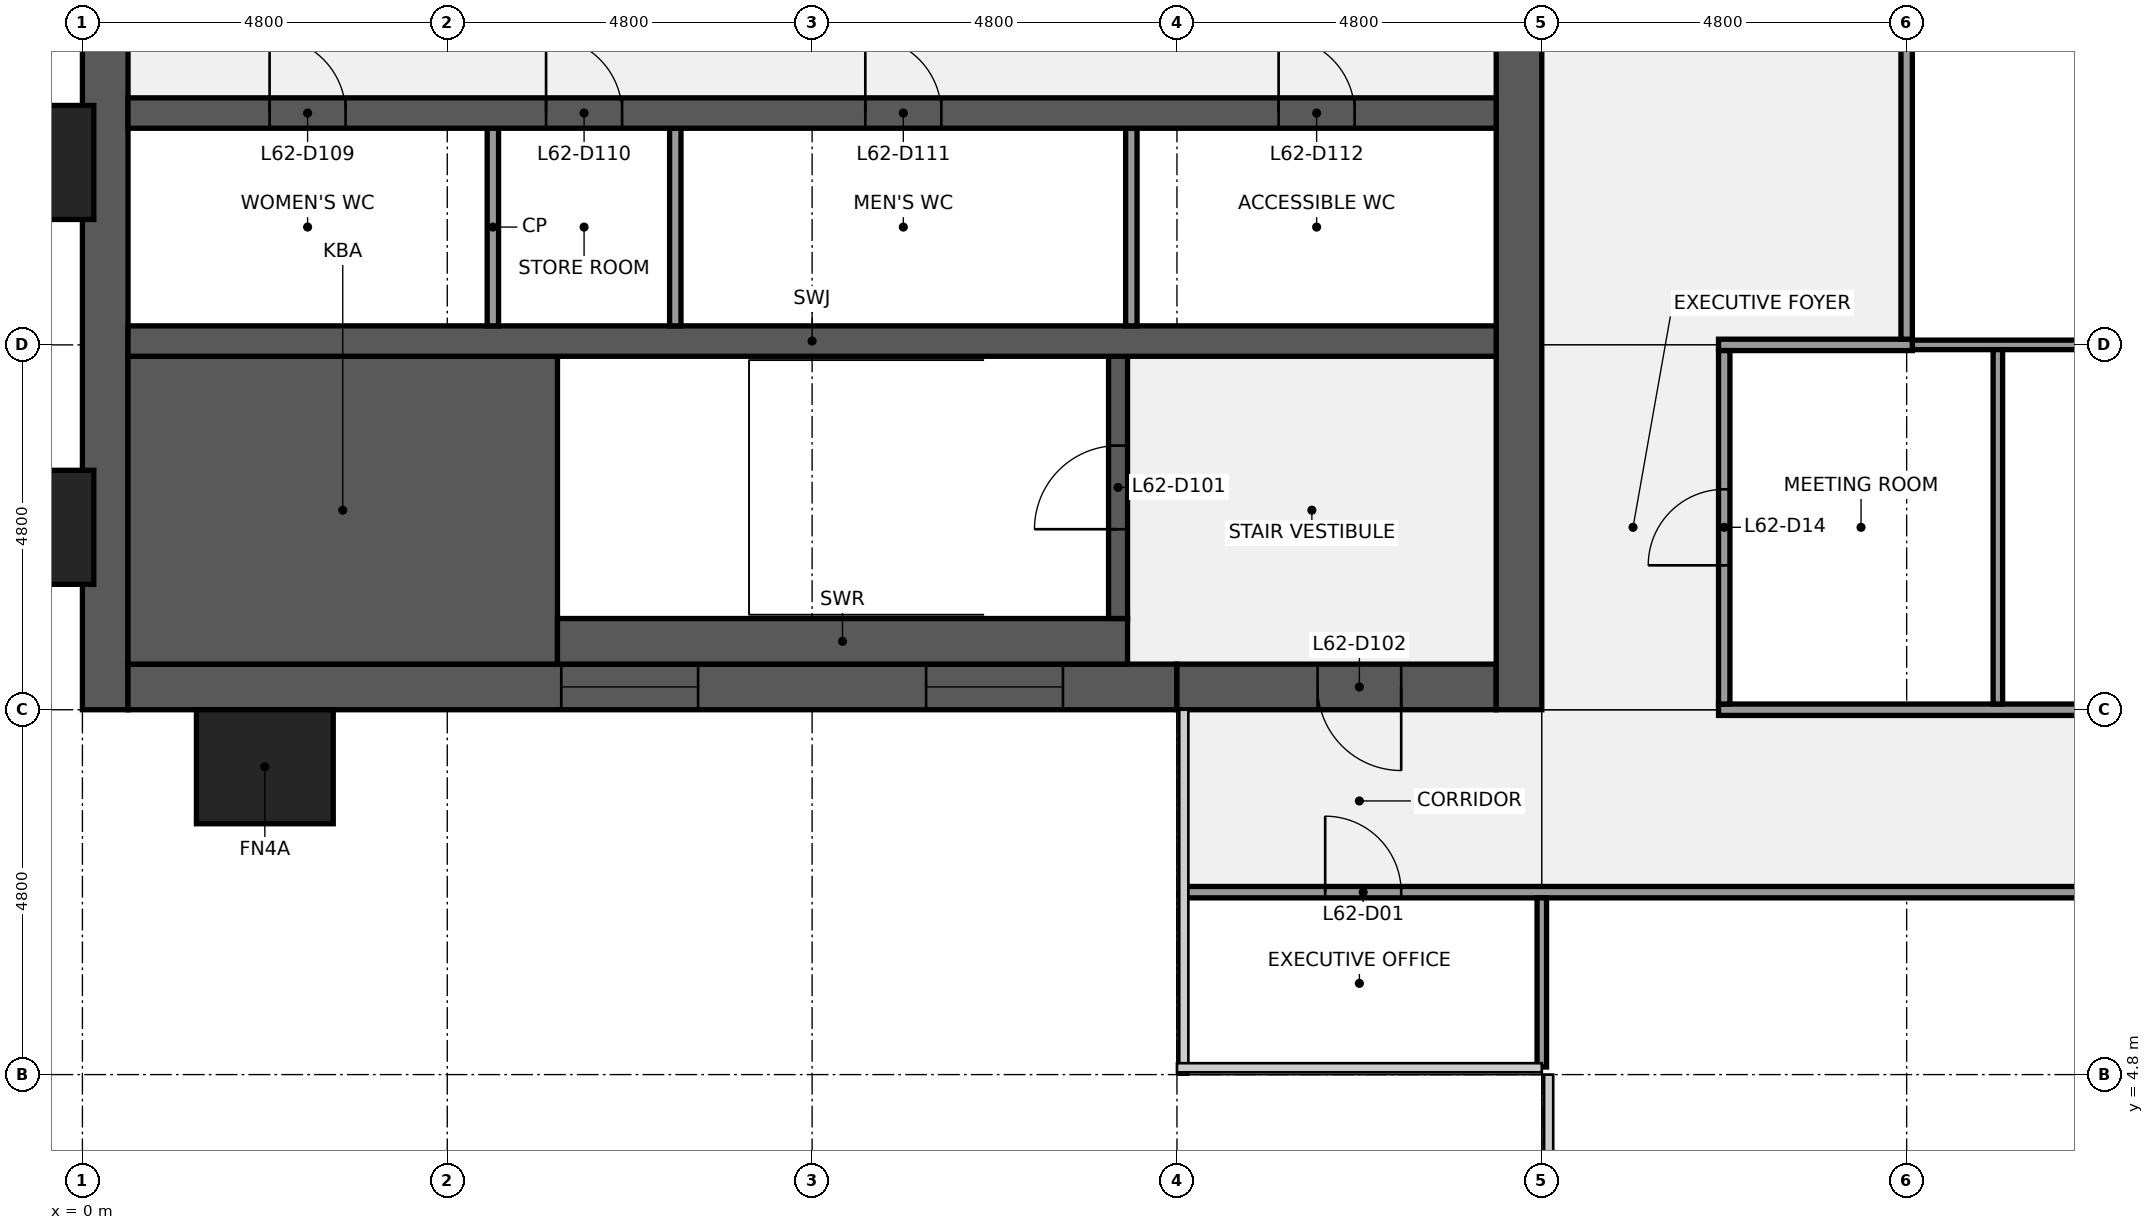
"""IFC4 building model, lengths in metres.
Left out: names, types, materials, properties, quantities, classifications, styles, units other than length and angle.
Written with IfcOpenShell. Run it as: python <this file> out.ifc"""

import sys

from ifc_helpers import new_model, si_unit, direction, frame, frame_2d, origin, origin_2d, place, context, subcontext, project, spatial, rectangle, extrude, element, fill, save


model = new_model("IFC4")
c1 = context("Model", 3, precision=1e-05, world=origin(), true_north=direction((0.0, 1.0)))
c2 = subcontext(c1, "Body", "Model", "MODEL_VIEW")
j1 = project(units=[si_unit("LENGTHUNIT", "METRE"), si_unit("PLANEANGLEUNIT", "RADIAN")], contexts=[c1])
p1 = place(None, origin())
s1 = spatial("IfcSite", under=j1, at=p1, CompositionType="ELEMENT")
p2 = place(p1, origin())
s2 = spatial("IfcBuilding", under=s1, at=p2, CompositionType="ELEMENT")
p3 = place(p2, frame((0.0, 0.0, 286.3)))
s3 = spatial("IfcBuildingStorey", under=s2, at=p3, CompositionType="ELEMENT", Elevation=286.3)
p4 = place(p3, frame((0.3, 9.6, 0.0), z_axis=(0.0, 0.0, 1.0), x_axis=(0.0, 1.0, 0.0)))
e1 = element("IfcWall", 1, at=p4, inside=s3, PredefinedType="SHEAR", context=c2, shape_type="SweptSolid", body=[
    extrude(rectangle(XDim=28.8, YDim=0.6, at=frame_2d((14.4, 0.0))), origin(), (0.0, 0.0, 1.0), 3.84),
])
p5 = place(p4, frame((8.85, 0.0, 0.9)))
e2 = element("IfcOpeningElement", 2, at=p5, cuts=e1, PredefinedType="OPENING", context=c2, shape_type="SweptSolid", body=[
    extrude(rectangle(XDim=1.5, YDim=1.5, at=frame_2d((0.75, 0.75))), frame((0.0, 0.31, 0.0), z_axis=(0.0, -1.0, 0.0), x_axis=(1.0, 0.0, 0.0)), (0.0, 0.0, 1.0), 0.62),
])
p6 = place(p4, frame((18.45, 0.0, 0.9)))
e3 = element("IfcOpeningElement", 3, at=p6, cuts=e1, PredefinedType="OPENING", context=c2, shape_type="SweptSolid", body=[
    extrude(rectangle(XDim=1.5, YDim=1.5, at=frame_2d((0.75, 0.75))), frame((0.0, 0.31, 0.0), z_axis=(0.0, -1.0, 0.0), x_axis=(1.0, 0.0, 0.0)), (0.0, 0.0, 1.0), 0.62),
])
p7 = place(p3, frame((14.4, 9.9, 0.0), z_axis=(0.0, 0.0, 1.0), x_axis=(-1.0, 0.0, 0.0)))
e4 = element("IfcWall", 4, at=p7, inside=s3, PredefinedType="SHEAR", context=c2, shape_type="SweptSolid", body=[
    extrude(rectangle(XDim=13.8, YDim=0.6, at=frame_2d((6.9, 0.0))), origin(), (0.0, 0.0, 1.0), 3.84),
])
p8 = place(p7, frame((6.3, 0.0, 0.9)))
e5 = element("IfcOpeningElement", 5, at=p8, cuts=e4, PredefinedType="OPENING", context=c2, shape_type="SweptSolid", body=[
    extrude(rectangle(XDim=1.8, YDim=1.5, at=frame_2d((0.9, 0.75))), frame((0.0, 0.31, 0.0), z_axis=(0.0, -1.0, 0.0), x_axis=(1.0, 0.0, 0.0)), (0.0, 0.0, 1.0), 0.62),
])
p9 = place(p7, frame((1.5, 0.0, 0.9)))
e6 = element("IfcOpeningElement", 6, at=p9, cuts=e4, PredefinedType="OPENING", context=c2, shape_type="SweptSolid", body=[
    extrude(rectangle(XDim=1.8, YDim=1.5, at=frame_2d((0.9, 0.75))), frame((0.0, 0.31, 0.0), z_axis=(0.0, -1.0, 0.0), x_axis=(1.0, 0.0, 0.0)), (0.0, 0.0, 1.0), 0.62),
])
p10 = place(p3, frame((18.6, 9.9, 0.0), z_axis=(0.0, 0.0, 1.0), x_axis=(-1.0, 0.0, 0.0)))
e7 = element("IfcWall", 7, at=p10, inside=s3, PredefinedType="SHEAR", context=c2, shape_type="SweptSolid", body=[
    extrude(rectangle(XDim=4.2, YDim=0.6, at=frame_2d((2.1, 0.0))), origin(), (0.0, 0.0, 1.0), 3.84),
])
p11 = place(p10, frame((1.25, 0.0, 0.0)))
e8 = element("IfcOpeningElement", 8, at=p11, cuts=e7, PredefinedType="OPENING", context=c2, shape_type="SweptSolid", body=[
    extrude(rectangle(XDim=1.1, YDim=2.1, at=frame_2d((0.55, 1.05))), frame((0.0, 0.31, 0.0), z_axis=(0.0, -1.0, 0.0), x_axis=(1.0, 0.0, 0.0)), (0.0, 0.0, 1.0), 0.62),
])
p12 = place(p3, frame((18.9, 38.4, 0.0), z_axis=(0.0, 0.0, 1.0), x_axis=(0.0, -1.0, 0.0)))
e9 = element("IfcWall", 9, at=p12, inside=s3, PredefinedType="SHEAR", context=c2, shape_type="SweptSolid", body=[
    extrude(rectangle(XDim=28.8, YDim=0.6, at=frame_2d((14.4, 0.0))), origin(), (0.0, 0.0, 1.0), 3.84),
])
p13 = place(p12, frame((18.3, 0.0, 0.0)))
e10 = element("IfcOpeningElement", 10, at=p13, cuts=e9, PredefinedType="OPENING", context=c2, shape_type="SweptSolid", body=[
    extrude(rectangle(XDim=1.8, YDim=2.1, at=frame_2d((0.9, 1.05))), frame((0.0, 0.31, 0.0), z_axis=(0.0, -1.0, 0.0), x_axis=(1.0, 0.0, 0.0)), (0.0, 0.0, 1.0), 0.62),
])
p14 = place(p12, frame((8.7, 0.0, 0.0)))
e11 = element("IfcOpeningElement", 11, at=p14, cuts=e9, PredefinedType="OPENING", context=c2, shape_type="SweptSolid", body=[
    extrude(rectangle(XDim=1.8, YDim=2.1, at=frame_2d((0.9, 1.05))), frame((0.0, 0.31, 0.0), z_axis=(0.0, -1.0, 0.0), x_axis=(1.0, 0.0, 0.0)), (0.0, 0.0, 1.0), 0.62),
])
p15 = place(p3, frame((0.6, 12.225, 0.0), z_axis=(0.0, 0.0, 1.0), x_axis=(1.0, 0.0, 0.0)))
e12 = element("IfcWall", 12, at=p15, inside=s3, PredefinedType="SHEAR", context=c2, shape_type="SweptSolid", body=[
    extrude(rectangle(XDim=5.65, YDim=4.05, at=frame_2d((2.825, 0.0))), origin(), (0.0, 0.0, 1.0), 3.84),
])
p16 = place(p3, frame((6.25, 10.5, 0.0), z_axis=(0.0, 0.0, 1.0), x_axis=(1.0, 0.0, 0.0)))
e13 = element("IfcWall", 13, at=p16, inside=s3, PredefinedType="SHEAR", context=c2, shape_type="SweptSolid", body=[
    extrude(rectangle(XDim=7.5, YDim=0.6, at=frame_2d((3.75, 0.0))), origin(), (0.0, 0.0, 1.0), 3.84),
])
p17 = place(p3, frame((13.625, 10.8, 0.0), z_axis=(0.0, 0.0, 1.0), x_axis=(0.0, 1.0, 0.0)))
e14 = element("IfcWall", 14, at=p17, inside=s3, PredefinedType="SHEAR", context=c2, shape_type="SweptSolid", body=[
    extrude(rectangle(XDim=3.45, YDim=0.25, at=frame_2d((1.725, 0.0))), origin(), (0.0, 0.0, 1.0), 3.84),
])
p18 = place(p17, frame((1.175, 0.0, 0.0)))
e15 = element("IfcOpeningElement", 15, at=p18, cuts=e14, PredefinedType="OPENING", context=c2, shape_type="SweptSolid", body=[
    extrude(rectangle(XDim=1.1, YDim=2.1, at=frame_2d((0.55, 1.05))), frame((0.0, 0.135, 0.0), z_axis=(0.0, -1.0, 0.0), x_axis=(1.0, 0.0, 0.0)), (0.0, 0.0, 1.0), 0.27),
])
p19 = place(p3, frame((0.6, 14.45, 0.0), z_axis=(0.0, 0.0, 1.0), x_axis=(1.0, 0.0, 0.0)))
e16 = element("IfcWall", 16, at=p19, inside=s3, PredefinedType="SHEAR", context=c2, shape_type="SweptSolid", body=[
    extrude(rectangle(XDim=18.0, YDim=0.4, at=frame_2d((9.0, 0.0))), origin(), (0.0, 0.0, 1.0), 3.84),
])
for number, where, z_axis, x_axis in (
    (17, (5.4, 14.65, 0.0), (0.0, 0.0, 1.0), (0.0, 1.0, 0.0)),
    (18, (7.8, 14.65, 0.0), (0.0, 0.0, 1.0), (0.0, 1.0, 0.0)),
    (19, (13.8, 14.65, 0.0), (0.0, 0.0, 1.0), (0.0, 1.0, 0.0)),
):
    element("IfcWall", number, at=place(p3, frame(where, z_axis=z_axis, x_axis=x_axis)), inside=s3, PredefinedType="PARTITIONING", context=c2, shape_type="SweptSolid", body=[
        extrude(rectangle(XDim=2.6, YDim=0.15, at=frame_2d((1.3, 0.0))), origin(), (0.0, 0.0, 1.0), 3.84),
    ])
p20 = place(p3, frame((0.6, 17.45, 0.0), z_axis=(0.0, 0.0, 1.0), x_axis=(1.0, 0.0, 0.0)))
e20 = element("IfcWall", 20, at=p20, inside=s3, PredefinedType="SHEAR", context=c2, shape_type="SweptSolid", body=[
    extrude(rectangle(XDim=18.0, YDim=0.4, at=frame_2d((9.0, 0.0))), origin(), (0.0, 0.0, 1.0), 3.84),
])
p21 = place(p20, frame((1.863, 0.0, 0.0)))
e21 = element("IfcOpeningElement", 21, at=p21, cuts=e20, PredefinedType="OPENING", context=c2, shape_type="SweptSolid", body=[
    extrude(rectangle(XDim=1.0, YDim=2.1, at=frame_2d((0.5, 1.05))), frame((0.0, 0.21, 0.0), z_axis=(0.0, -1.0, 0.0), x_axis=(1.0, 0.0, 0.0)), (0.0, 0.0, 1.0), 0.42),
])
p22 = place(p20, frame((5.5, 0.0, 0.0)))
e22 = element("IfcOpeningElement", 22, at=p22, cuts=e20, PredefinedType="OPENING", context=c2, shape_type="SweptSolid", body=[
    extrude(rectangle(XDim=1.0, YDim=2.1, at=frame_2d((0.5, 1.05))), frame((0.0, 0.21, 0.0), z_axis=(0.0, -1.0, 0.0), x_axis=(1.0, 0.0, 0.0)), (0.0, 0.0, 1.0), 0.42),
])
p23 = place(p20, frame((9.7, 0.0, 0.0)))
e23 = element("IfcOpeningElement", 23, at=p23, cuts=e20, PredefinedType="OPENING", context=c2, shape_type="SweptSolid", body=[
    extrude(rectangle(XDim=1.0, YDim=2.1, at=frame_2d((0.5, 1.05))), frame((0.0, 0.21, 0.0), z_axis=(0.0, -1.0, 0.0), x_axis=(1.0, 0.0, 0.0)), (0.0, 0.0, 1.0), 0.42),
])
p24 = place(p20, frame((15.137, 0.0, 0.0)))
e24 = element("IfcOpeningElement", 24, at=p24, cuts=e20, PredefinedType="OPENING", context=c2, shape_type="SweptSolid", body=[
    extrude(rectangle(XDim=1.0, YDim=2.1, at=frame_2d((0.5, 1.05))), frame((0.0, 0.21, 0.0), z_axis=(0.0, -1.0, 0.0), x_axis=(1.0, 0.0, 0.0)), (0.0, 0.0, 1.0), 0.42),
])
p25 = place(p3, frame((14.5, 7.2, 0.0), z_axis=(0.0, 0.0, 1.0), x_axis=(1.0, 0.0, 0.0)))
e25 = element("IfcWall", 25, at=p25, inside=s3, PredefinedType="PARTITIONING", context=c2, shape_type="SweptSolid", body=[
    extrude(rectangle(XDim=28.6, YDim=0.15, at=frame_2d((14.3, 0.0))), origin(), (0.0, 0.0, 1.0), 2.849),
])
p26 = place(p25, frame((1.85, 0.0, 0.0)))
e26 = element("IfcOpeningElement", 26, at=p26, cuts=e25, PredefinedType="OPENING", context=c2, shape_type="SweptSolid", body=[
    extrude(rectangle(XDim=1.0, YDim=2.1, at=frame_2d((0.5, 1.05))), frame((0.0, 0.085, 0.0), z_axis=(0.0, -1.0, 0.0), x_axis=(1.0, 0.0, 0.0)), (0.0, 0.0, 1.0), 0.17),
])
p27 = place(p25, frame((13.8, 0.0, 0.0)))
e27 = element("IfcOpeningElement", 27, at=p27, cuts=e25, PredefinedType="OPENING", context=c2, shape_type="SweptSolid", body=[
    extrude(rectangle(XDim=1.0, YDim=2.1, at=frame_2d((0.5, 1.05))), frame((0.0, 0.085, 0.0), z_axis=(0.0, -1.0, 0.0), x_axis=(1.0, 0.0, 0.0)), (0.0, 0.0, 1.0), 0.17),
])
p28 = place(p25, frame((25.75, 0.0, 0.0)))
e28 = element("IfcOpeningElement", 28, at=p28, cuts=e25, PredefinedType="OPENING", context=c2, shape_type="SweptSolid", body=[
    extrude(rectangle(XDim=1.0, YDim=2.1, at=frame_2d((0.5, 1.05))), frame((0.0, 0.085, 0.0), z_axis=(0.0, -1.0, 0.0), x_axis=(1.0, 0.0, 0.0)), (0.0, 0.0, 1.0), 0.17),
])
p29 = place(p3, frame((21.525, 9.6, 0.0), z_axis=(0.0, 0.0, 1.0), x_axis=(1.0, 0.0, 0.0)))
e29 = element("IfcWall", 29, at=p29, inside=s3, PredefinedType="PARTITIONING", context=c2, shape_type="SweptSolid", body=[
    extrude(rectangle(XDim=14.55, YDim=0.15, at=frame_2d((7.275, 0.0))), origin(), (0.0, 0.0, 1.0), 2.849),
])
p30 = place(p29, frame((6.775, 0.0, 0.0)))
e30 = element("IfcOpeningElement", 30, at=p30, cuts=e29, PredefinedType="OPENING", context=c2, shape_type="SweptSolid", body=[
    extrude(rectangle(XDim=1.0, YDim=2.1, at=frame_2d((0.5, 1.05))), frame((0.0, 0.085, 0.0), z_axis=(0.0, -1.0, 0.0), x_axis=(1.0, 0.0, 0.0)), (0.0, 0.0, 1.0), 0.17),
])
p31 = place(p3, frame((24.075, 14.4, 0.0), z_axis=(0.0, 0.0, 1.0), x_axis=(1.0, 0.0, 0.0)))
e31 = element("IfcWall", 31, at=p31, inside=s3, PredefinedType="PARTITIONING", context=c2, shape_type="SweptSolid", body=[
    extrude(rectangle(XDim=9.6, YDim=0.125, at=frame_2d((4.8, 0.0))), origin(), (0.0, 0.0, 1.0), 2.849),
])
p32 = place(p3, frame((21.525, 14.4, 0.0), z_axis=(0.0, 0.0, 1.0), x_axis=(1.0, 0.0, 0.0)))
e32 = element("IfcWall", 32, at=p32, inside=s3, PredefinedType="PARTITIONING", context=c2, shape_type="SweptSolid", body=[
    extrude(rectangle(XDim=2.55, YDim=0.15, at=frame_2d((1.275, 0.0))), origin(), (0.0, 0.0, 1.0), 2.849),
])
p33 = place(p3, frame((19.2, 4.9, 0.0), z_axis=(0.0, 0.0, 1.0), x_axis=(0.0, 1.0, 0.0)))
e33 = element("IfcWall", 33, at=p33, inside=s3, PredefinedType="PARTITIONING", context=c2, shape_type="SweptSolid", body=[
    extrude(rectangle(XDim=2.225, YDim=0.125, at=frame_2d((1.113, 0.0))), origin(), (0.0, 0.0, 1.0), 2.849),
])
p34 = place(p3, frame((21.6, 9.675, 0.0), z_axis=(0.0, 0.0, 1.0), x_axis=(0.0, 1.0, 0.0)))
e34 = element("IfcWall", 34, at=p34, inside=s3, PredefinedType="PARTITIONING", context=c2, shape_type="SweptSolid", body=[
    extrude(rectangle(XDim=4.65, YDim=0.15, at=frame_2d((2.325, 0.0))), origin(), (0.0, 0.0, 1.0), 2.849),
])
p35 = place(p34, frame((1.825, 0.0, 0.0)))
e35 = element("IfcOpeningElement", 35, at=p35, cuts=e34, PredefinedType="OPENING", context=c2, shape_type="SweptSolid", body=[
    extrude(rectangle(XDim=1.0, YDim=2.1, at=frame_2d((0.5, 1.05))), frame((0.0, 0.085, 0.0), z_axis=(0.0, -1.0, 0.0), x_axis=(1.0, 0.0, 0.0)), (0.0, 0.0, 1.0), 0.17),
])
p36 = place(p3, frame((24.0, 14.475, 0.0), z_axis=(0.0, 0.0, 1.0), x_axis=(0.0, 1.0, 0.0)))
e36 = element("IfcWall", 36, at=p36, inside=s3, PredefinedType="PARTITIONING", context=c2, shape_type="SweptSolid", body=[
    extrude(rectangle(XDim=10.65, YDim=0.15, at=frame_2d((5.325, 0.0))), origin(), (0.0, 0.0, 1.0), 2.849),
])
p37 = place(p36, frame((4.825, 0.0, 0.0)))
e37 = element("IfcOpeningElement", 37, at=p37, cuts=e36, PredefinedType="OPENING", context=c2, shape_type="SweptSolid", body=[
    extrude(rectangle(XDim=1.0, YDim=2.1, at=frame_2d((0.5, 1.05))), frame((0.0, 0.085, 0.0), z_axis=(0.0, -1.0, 0.0), x_axis=(1.0, 0.0, 0.0)), (0.0, 0.0, 1.0), 0.17),
])
p38 = place(p3, frame((25.2, 9.675, 0.0), z_axis=(0.0, 0.0, 1.0), x_axis=(0.0, 1.0, 0.0)))
e38 = element("IfcWall", 38, at=p38, inside=s3, PredefinedType="PARTITIONING", context=c2, shape_type="SweptSolid", body=[
    extrude(rectangle(XDim=4.662, YDim=0.125, at=frame_2d((2.331, 0.0))), origin(), (0.0, 0.0, 1.0), 2.849),
])
for number, where, z_axis, x_axis in (
    (39, (-0.75, 12.0, 0.0), (0.0, 0.0, 1.0), (0.0, 1.0, 0.0)),
    (40, (-0.75, 16.8, 0.0), (0.0, 0.0, 1.0), (0.0, 1.0, 0.0)),
    (41, (2.4, 8.85, 0.0), (0.0, 0.0, 1.0), (1.0, 0.0, 0.0)),
):
    element("IfcColumn", number, at=place(p3, frame(where, z_axis=z_axis, x_axis=x_axis)), inside=s3, PredefinedType="PILASTER", context=c2, shape_type="SweptSolid", body=[
        extrude(rectangle(XDim=1.8, YDim=1.5, at=origin_2d()), origin(), (0.0, 0.0, 1.0), 4.0),
    ])
p39 = place(p18, origin())
e42 = element("IfcDoor", 42, at=p39, inside=s3, OperationType="SINGLE_SWING_LEFT", PredefinedType="DOOR", context=c2, shape_type="SweptSolid", body=[
    extrude(rectangle(XDim=1.1, YDim=2.1, at=frame_2d((0.55, 1.05))), frame((0.0, 0.025, 0.0), z_axis=(0.0, -1.0, 0.0), x_axis=(1.0, 0.0, 0.0)), (0.0, 0.0, 1.0), 0.05),
])
fill(e15, e42)
p40 = place(p11, origin())
e43 = element("IfcDoor", 43, at=p40, inside=s3, OperationType="SINGLE_SWING_LEFT", PredefinedType="DOOR", context=c2, shape_type="SweptSolid", body=[
    extrude(rectangle(XDim=1.1, YDim=2.1, at=frame_2d((0.55, 1.05))), frame((0.0, 0.025, 0.0), z_axis=(0.0, -1.0, 0.0), x_axis=(1.0, 0.0, 0.0)), (0.0, 0.0, 1.0), 0.05),
])
fill(e8, e43)
p41 = place(p21, origin())
e44 = element("IfcDoor", 44, at=p41, inside=s3, OperationType="SINGLE_SWING_LEFT", PredefinedType="DOOR", context=c2, shape_type="SweptSolid", body=[
    extrude(rectangle(XDim=1.0, YDim=2.1, at=frame_2d((0.5, 1.05))), frame((0.0, 0.025, 0.0), z_axis=(0.0, -1.0, 0.0), x_axis=(1.0, 0.0, 0.0)), (0.0, 0.0, 1.0), 0.05),
])
fill(e21, e44)
p42 = place(p22, origin())
e45 = element("IfcDoor", 45, at=p42, inside=s3, OperationType="SINGLE_SWING_LEFT", PredefinedType="DOOR", context=c2, shape_type="SweptSolid", body=[
    extrude(rectangle(XDim=1.0, YDim=2.1, at=frame_2d((0.5, 1.05))), frame((0.0, 0.025, 0.0), z_axis=(0.0, -1.0, 0.0), x_axis=(1.0, 0.0, 0.0)), (0.0, 0.0, 1.0), 0.05),
])
fill(e22, e45)
p43 = place(p23, origin())
e46 = element("IfcDoor", 46, at=p43, inside=s3, OperationType="SINGLE_SWING_LEFT", PredefinedType="DOOR", context=c2, shape_type="SweptSolid", body=[
    extrude(rectangle(XDim=1.0, YDim=2.1, at=frame_2d((0.5, 1.05))), frame((0.0, 0.025, 0.0), z_axis=(0.0, -1.0, 0.0), x_axis=(1.0, 0.0, 0.0)), (0.0, 0.0, 1.0), 0.05),
])
fill(e23, e46)
p44 = place(p24, origin())
e47 = element("IfcDoor", 47, at=p44, inside=s3, OperationType="SINGLE_SWING_LEFT", PredefinedType="DOOR", context=c2, shape_type="SweptSolid", body=[
    extrude(rectangle(XDim=1.0, YDim=2.1, at=frame_2d((0.5, 1.05))), frame((0.0, 0.025, 0.0), z_axis=(0.0, -1.0, 0.0), x_axis=(1.0, 0.0, 0.0)), (0.0, 0.0, 1.0), 0.05),
])
fill(e24, e47)
p45 = place(p8, origin())
e48 = element("IfcWindow", 48, at=p45, inside=s3, PartitioningType="SINGLE_PANEL", PredefinedType="WINDOW", context=c2, shape_type="SweptSolid", body=[
    extrude(rectangle(XDim=1.8, YDim=1.5, at=frame_2d((0.9, 0.75))), frame((0.0, 0.03, 0.0), z_axis=(0.0, -1.0, 0.0), x_axis=(1.0, 0.0, 0.0)), (0.0, 0.0, 1.0), 0.06),
])
fill(e5, e48)
p46 = place(p9, origin())
e49 = element("IfcWindow", 49, at=p46, inside=s3, PartitioningType="SINGLE_PANEL", PredefinedType="WINDOW", context=c2, shape_type="SweptSolid", body=[
    extrude(rectangle(XDim=1.8, YDim=1.5, at=frame_2d((0.9, 0.75))), frame((0.0, 0.03, 0.0), z_axis=(0.0, -1.0, 0.0), x_axis=(1.0, 0.0, 0.0)), (0.0, 0.0, 1.0), 0.06),
])
fill(e6, e49)
p47 = place(p26, origin())
e50 = element("IfcDoor", 50, at=p47, inside=s3, OperationType="SINGLE_SWING_LEFT", PredefinedType="DOOR", context=c2, shape_type="SweptSolid", body=[
    extrude(rectangle(XDim=1.0, YDim=2.1, at=frame_2d((0.5, 1.05))), frame((0.0, 0.025, 0.0), z_axis=(0.0, -1.0, 0.0), x_axis=(1.0, 0.0, 0.0)), (0.0, 0.0, 1.0), 0.05),
])
fill(e26, e50)
p48 = place(p35, origin())
e51 = element("IfcDoor", 51, at=p48, inside=s3, OperationType="SINGLE_SWING_LEFT", PredefinedType="DOOR", context=c2, shape_type="SweptSolid", body=[
    extrude(rectangle(XDim=1.0, YDim=2.1, at=frame_2d((0.5, 1.05))), frame((0.0, 0.025, 0.0), z_axis=(0.0, -1.0, 0.0), x_axis=(1.0, 0.0, 0.0)), (0.0, 0.0, 1.0), 0.05),
])
fill(e35, e51)
save(model, sys.argv[1])
